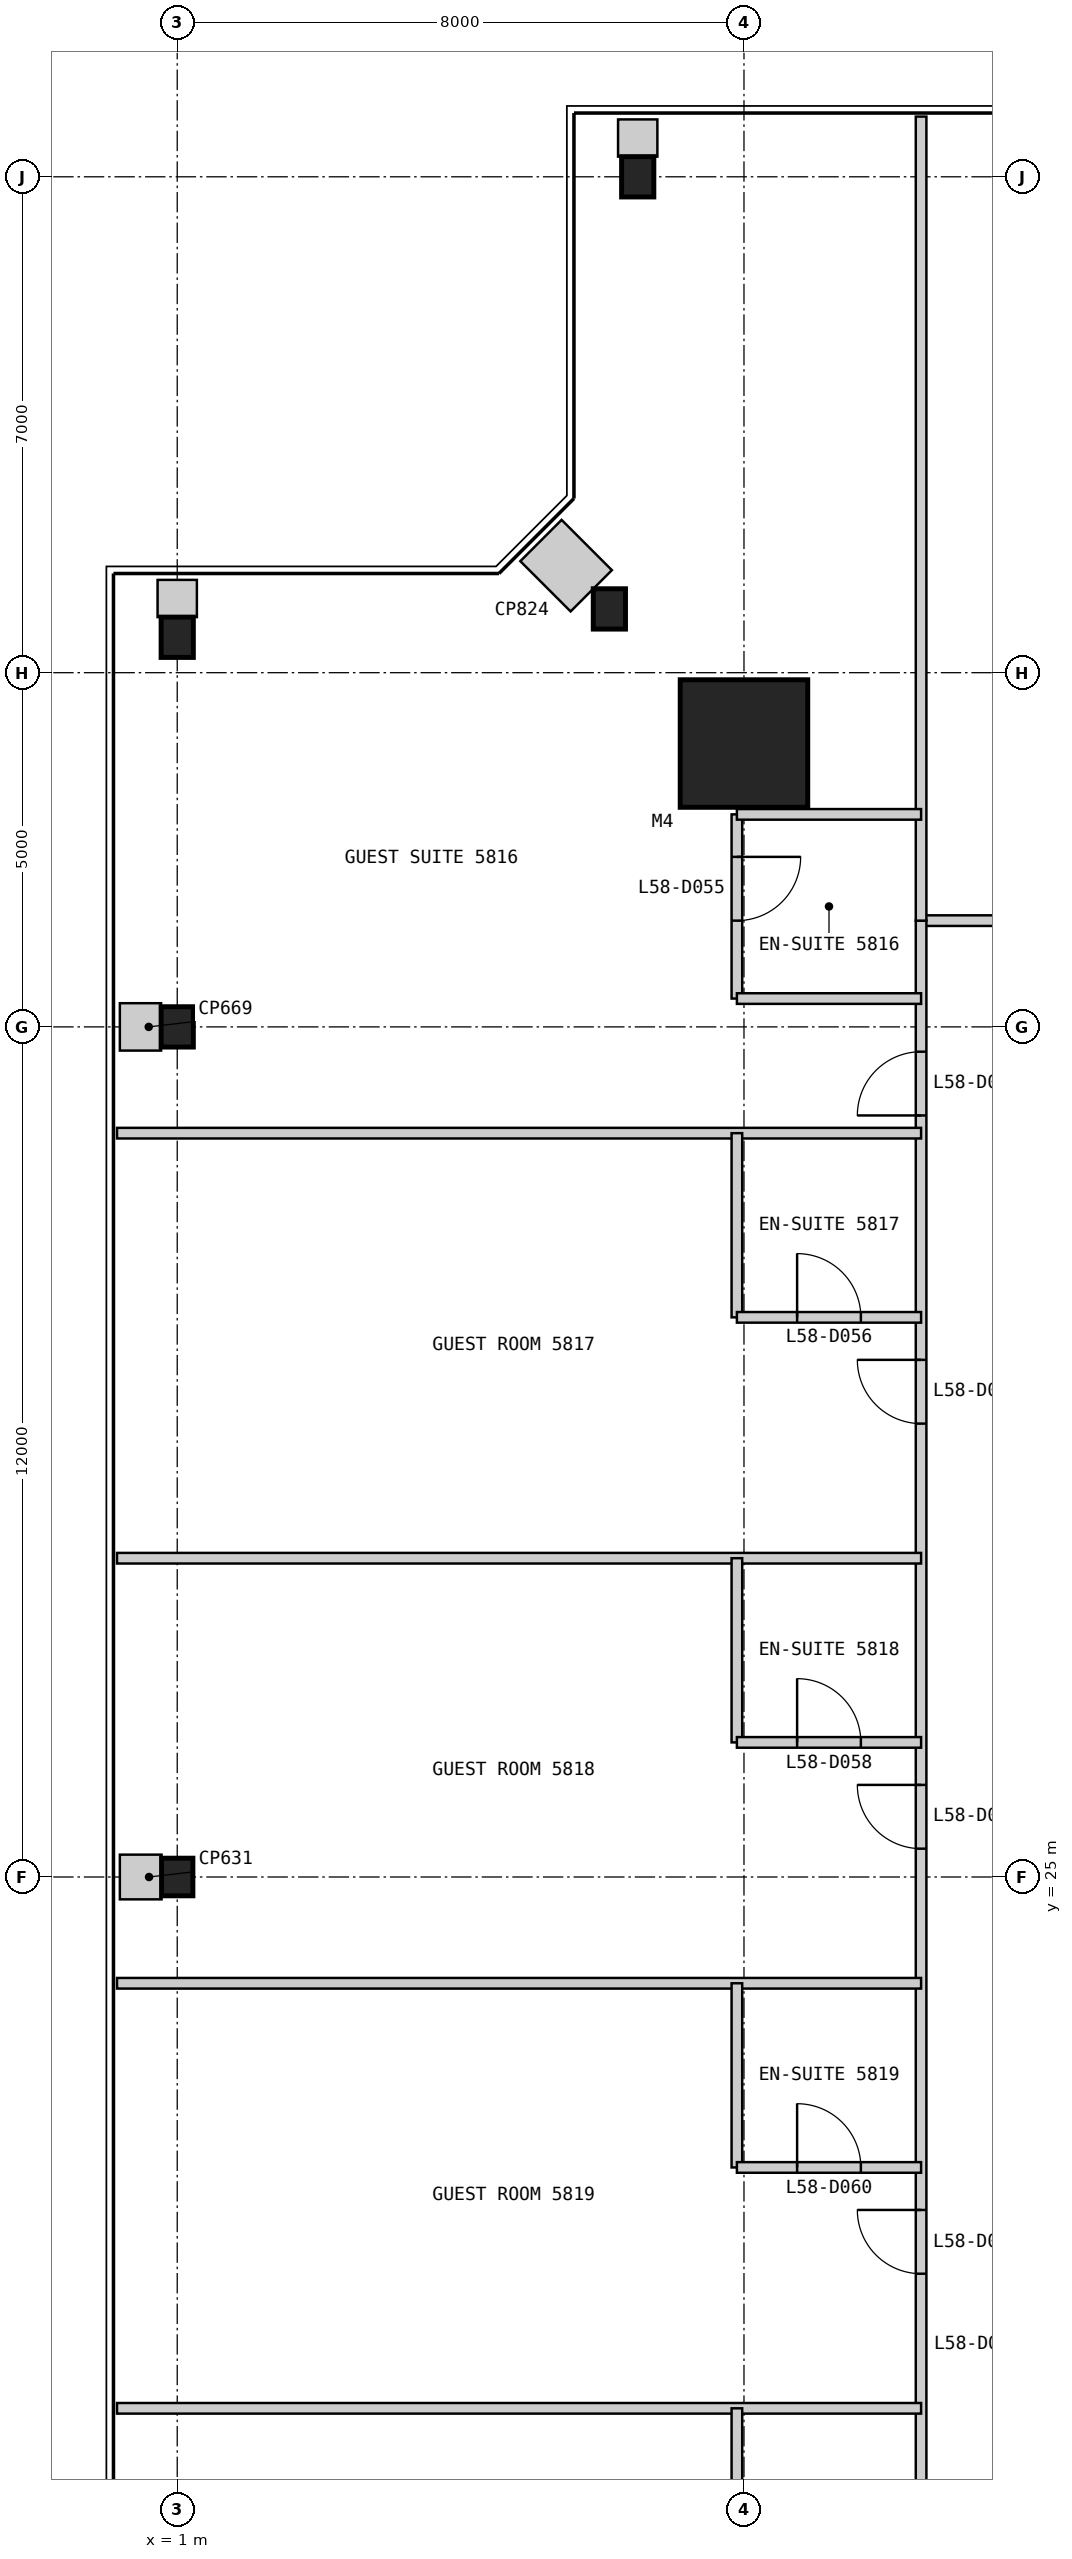
"""IFC4 building model, lengths in metres.
Left out: names, types, materials, properties, quantities, classifications, styles, units other than length and angle.
Written with IfcOpenShell. Run it as: python <this file> out.ifc"""

import sys

from ifc_helpers import new_model, si_unit, direction, frame, frame_2d, origin, origin_2d, place, context, subcontext, project, spatial, rectangle, i_section, extrude, element, fill, save


model = new_model("IFC4")
c1 = context("Model", 3, precision=1e-05, world=origin(), true_north=direction((0.0, 1.0)))
c2 = subcontext(c1, "Body", "Model", "MODEL_VIEW")
j1 = project(units=[si_unit("LENGTHUNIT", "METRE"), si_unit("PLANEANGLEUNIT", "RADIAN")], contexts=[c1])
p1 = place(None, origin())
s1 = spatial("IfcSite", under=j1, at=p1, CompositionType="ELEMENT")
p2 = place(p1, origin())
s2 = spatial("IfcBuilding", under=s1, at=p2, CompositionType="ELEMENT")
p3 = place(p2, frame((0.0, 0.0, 249.2)))
s3 = spatial("IfcBuildingStorey", under=s2, at=p3, CompositionType="ELEMENT", Elevation=249.2)
p4 = place(p3, frame((9.0, 41.0, 0.0), z_axis=(0.0, 0.0, 1.0), x_axis=(1.0, 0.0, 0.0)))
e1 = element("IfcColumn", 1, at=p4, inside=s3, PredefinedType="COLUMN", context=c2, shape_type="SweptSolid", body=[
    extrude(rectangle(XDim=1.8, YDim=1.8, at=origin_2d()), origin(), (0.0, 0.0, 1.0), 3.4),
])
for number, where, z_axis, x_axis in (
    (2, (7.5, 49.0, 0.0), (0.0, 0.0, 1.0), (1.0, 0.0, 0.0)),
    (3, (7.1, 42.9, 0.0), (0.0, 0.0, 1.0), (1.0, 0.0, 0.0)),
    (4, (1.0, 42.5, 0.0), (0.0, 0.0, 1.0), (1.0, 0.0, 0.0)),
    (5, (1.0, 37.0, 0.0), (0.0, 0.0, 1.0), (1.0, 0.0, 0.0)),
):
    element("IfcColumn", number, at=place(p3, frame(where, z_axis=z_axis, x_axis=x_axis)), inside=s3, PredefinedType="COLUMN", context=c2, shape_type="SweptSolid", body=[
        extrude(i_section(OverallWidth=0.455, OverallDepth=0.569, WebThickness=0.078, FlangeThickness=0.125, at=origin_2d()), origin(), (0.0, 0.0, 1.0), 3.4),
    ])
p5 = place(p3, frame((1.0, 25.0, 0.0), z_axis=(0.0, 0.0, 1.0), x_axis=(1.0, 0.0, 0.0)))
e6 = element("IfcColumn", 6, at=p5, inside=s3, PredefinedType="COLUMN", context=c2, shape_type="SweptSolid", body=[
    extrude(i_section(OverallWidth=0.442, OverallDepth=0.531, WebThickness=0.066, FlangeThickness=0.106, at=origin_2d()), origin(), (0.0, 0.0, 1.0), 3.4),
])
p6 = place(p3, frame((38.5, 38.5, 0.0), z_axis=(0.0, 0.0, 1.0), x_axis=(-1.0, 0.0, 0.0)))
e7 = element("IfcWall", 7, at=p6, inside=s3, PredefinedType="PARTITIONING", context=c2, shape_type="SweptSolid", body=[
    extrude(rectangle(XDim=27.0, YDim=0.15, at=frame_2d((13.5, 0.0))), origin(), (0.0, 0.0, 1.0), 3.25),
])
p7 = place(p6, frame((1.85, 0.0, 0.0)))
e8 = element("IfcOpeningElement", 8, at=p7, cuts=e7, PredefinedType="OPENING", context=c2, shape_type="SweptSolid", body=[
    extrude(rectangle(XDim=0.9, YDim=2.1, at=frame_2d((0.45, 1.05))), frame((0.0, 0.085, 0.0), z_axis=(0.0, -1.0, 0.0), x_axis=(1.0, 0.0, 0.0)), (0.0, 0.0, 1.0), 0.17),
])
p8 = place(p6, frame((6.2, 0.0, 0.0)))
e9 = element("IfcOpeningElement", 9, at=p8, cuts=e7, PredefinedType="OPENING", context=c2, shape_type="SweptSolid", body=[
    extrude(rectangle(XDim=0.9, YDim=2.1, at=frame_2d((0.45, 1.05))), frame((0.0, 0.085, 0.0), z_axis=(0.0, -1.0, 0.0), x_axis=(1.0, 0.0, 0.0)), (0.0, 0.0, 1.0), 0.17),
])
p9 = place(p6, frame((12.8, 0.0, 0.0)))
e10 = element("IfcOpeningElement", 10, at=p9, cuts=e7, PredefinedType="OPENING", context=c2, shape_type="SweptSolid", body=[
    extrude(rectangle(XDim=1.0, YDim=2.1, at=frame_2d((0.5, 1.05))), frame((0.0, 0.085, 0.0), z_axis=(0.0, -1.0, 0.0), x_axis=(1.0, 0.0, 0.0)), (0.0, 0.0, 1.0), 0.17),
])
p10 = place(p6, frame((18.2, 0.0, 0.0)))
e11 = element("IfcOpeningElement", 11, at=p10, cuts=e7, PredefinedType="OPENING", context=c2, shape_type="SweptSolid", body=[
    extrude(rectangle(XDim=0.9, YDim=2.1, at=frame_2d((0.45, 1.05))), frame((0.0, 0.085, 0.0), z_axis=(0.0, -1.0, 0.0), x_axis=(1.0, 0.0, 0.0)), (0.0, 0.0, 1.0), 0.17),
])
p11 = place(p6, frame((24.2, 0.0, 0.0)))
e12 = element("IfcOpeningElement", 12, at=p11, cuts=e7, PredefinedType="OPENING", context=c2, shape_type="SweptSolid", body=[
    extrude(rectangle(XDim=0.9, YDim=2.1, at=frame_2d((0.45, 1.05))), frame((0.0, 0.085, 0.0), z_axis=(0.0, -1.0, 0.0), x_axis=(1.0, 0.0, 0.0)), (0.0, 0.0, 1.0), 0.17),
])
p12 = place(p3, frame((11.5, 38.5, 0.0), z_axis=(0.0, 0.0, 1.0), x_axis=(0.0, -1.0, 0.0)))
e13 = element("IfcWall", 13, at=p12, inside=s3, PredefinedType="PARTITIONING", context=c2, shape_type="SweptSolid", body=[
    extrude(rectangle(XDim=27.0, YDim=0.15, at=frame_2d((13.5, 0.0))), origin(), (0.0, 0.0, 1.0), 3.25),
])
p13 = place(p12, frame((1.85, 0.0, 0.0)))
e14 = element("IfcOpeningElement", 14, at=p13, cuts=e13, PredefinedType="OPENING", context=c2, shape_type="SweptSolid", body=[
    extrude(rectangle(XDim=0.9, YDim=2.1, at=frame_2d((0.45, 1.05))), frame((0.0, 0.085, 0.0), z_axis=(0.0, -1.0, 0.0), x_axis=(1.0, 0.0, 0.0)), (0.0, 0.0, 1.0), 0.17),
])
p14 = place(p12, frame((6.2, 0.0, 0.0)))
e15 = element("IfcOpeningElement", 15, at=p14, cuts=e13, PredefinedType="OPENING", context=c2, shape_type="SweptSolid", body=[
    extrude(rectangle(XDim=0.9, YDim=2.1, at=frame_2d((0.45, 1.05))), frame((0.0, 0.085, 0.0), z_axis=(0.0, -1.0, 0.0), x_axis=(1.0, 0.0, 0.0)), (0.0, 0.0, 1.0), 0.17),
])
p15 = place(p12, frame((12.2, 0.0, 0.0)))
e16 = element("IfcOpeningElement", 16, at=p15, cuts=e13, PredefinedType="OPENING", context=c2, shape_type="SweptSolid", body=[
    extrude(rectangle(XDim=0.9, YDim=2.1, at=frame_2d((0.45, 1.05))), frame((0.0, 0.085, 0.0), z_axis=(0.0, -1.0, 0.0), x_axis=(1.0, 0.0, 0.0)), (0.0, 0.0, 1.0), 0.17),
])
p16 = place(p12, frame((18.2, 0.0, 0.0)))
e17 = element("IfcOpeningElement", 17, at=p16, cuts=e13, PredefinedType="OPENING", context=c2, shape_type="SweptSolid", body=[
    extrude(rectangle(XDim=0.9, YDim=2.1, at=frame_2d((0.45, 1.05))), frame((0.0, 0.085, 0.0), z_axis=(0.0, -1.0, 0.0), x_axis=(1.0, 0.0, 0.0)), (0.0, 0.0, 1.0), 0.17),
])
p17 = place(p12, frame((24.2, 0.0, 0.0)))
e18 = element("IfcOpeningElement", 18, at=p17, cuts=e13, PredefinedType="OPENING", context=c2, shape_type="SweptSolid", body=[
    extrude(rectangle(XDim=0.9, YDim=2.1, at=frame_2d((0.45, 1.05))), frame((0.0, 0.085, 0.0), z_axis=(0.0, -1.0, 0.0), x_axis=(1.0, 0.0, 0.0)), (0.0, 0.0, 1.0), 0.17),
])
p18 = place(p3, frame((11.5, 49.85, 0.0), z_axis=(0.0, 0.0, 1.0), x_axis=(0.0, -1.0, 0.0)))
e19 = element("IfcWall", 19, at=p18, inside=s3, PredefinedType="PARTITIONING", context=c2, shape_type="SweptSolid", body=[
    extrude(rectangle(XDim=11.35, YDim=0.15, at=frame_2d((5.675, 0.0))), origin(), (0.0, 0.0, 1.0), 3.25),
])
p19 = place(p3, frame((8.9, 40.0, 0.0), z_axis=(0.0, 0.0, 1.0), x_axis=(0.0, -1.0, 0.0)))
e20 = element("IfcWall", 20, at=p19, inside=s3, PredefinedType="PARTITIONING", context=c2, shape_type="SweptSolid", body=[
    extrude(rectangle(XDim=2.6, YDim=0.15, at=frame_2d((1.3, 0.0))), origin(), (0.0, 0.0, 1.0), 2.638),
])
p20 = place(p19, frame((0.6, 0.0, 0.0)))
e21 = element("IfcOpeningElement", 21, at=p20, cuts=e20, PredefinedType="OPENING", context=c2, shape_type="SweptSolid", body=[
    extrude(rectangle(XDim=0.9, YDim=2.1, at=frame_2d((0.45, 1.05))), frame((0.0, 0.085, 0.0), z_axis=(0.0, -1.0, 0.0), x_axis=(1.0, 0.0, 0.0)), (0.0, 0.0, 1.0), 0.17),
])
for number, where, z_axis, x_axis in (
    (22, (8.9, 40.0, 0.0), (0.0, 0.0, 1.0), (1.0, 0.0, 0.0)),
    (23, (8.9, 37.4, 0.0), (0.0, 0.0, 1.0), (1.0, 0.0, 0.0)),
):
    element("IfcWall", number, at=place(p3, frame(where, z_axis=z_axis, x_axis=x_axis)), inside=s3, PredefinedType="PARTITIONING", context=c2, shape_type="SweptSolid", body=[
        extrude(rectangle(XDim=2.6, YDim=0.15, at=frame_2d((1.3, 0.0))), origin(), (0.0, 0.0, 1.0), 3.25),
    ])
p21 = place(p3, frame((0.15, 35.5, 0.0), z_axis=(0.0, 0.0, 1.0), x_axis=(1.0, 0.0, 0.0)))
e24 = element("IfcWall", 24, at=p21, inside=s3, PredefinedType="PARTITIONING", context=c2, shape_type="SweptSolid", body=[
    extrude(rectangle(XDim=11.35, YDim=0.15, at=frame_2d((5.675, 0.0))), origin(), (0.0, 0.0, 1.0), 3.25),
])
p22 = place(p3, frame((8.9, 35.5, 0.0), z_axis=(0.0, 0.0, 1.0), x_axis=(0.0, -1.0, 0.0)))
e25 = element("IfcWall", 25, at=p22, inside=s3, PredefinedType="PARTITIONING", context=c2, shape_type="SweptSolid", body=[
    extrude(rectangle(XDim=2.6, YDim=0.15, at=frame_2d((1.3, 0.0))), origin(), (0.0, 0.0, 1.0), 3.25),
])
p23 = place(p3, frame((8.9, 32.9, 0.0), z_axis=(0.0, 0.0, 1.0), x_axis=(1.0, 0.0, 0.0)))
e26 = element("IfcWall", 26, at=p23, inside=s3, PredefinedType="PARTITIONING", context=c2, shape_type="SweptSolid", body=[
    extrude(rectangle(XDim=2.6, YDim=0.15, at=frame_2d((1.3, 0.0))), origin(), (0.0, 0.0, 1.0), 3.25),
])
p24 = place(p23, frame((0.85, 0.0, 0.0)))
e27 = element("IfcOpeningElement", 27, at=p24, cuts=e26, PredefinedType="OPENING", context=c2, shape_type="SweptSolid", body=[
    extrude(rectangle(XDim=0.9, YDim=2.1, at=frame_2d((0.45, 1.05))), frame((0.0, 0.085, 0.0), z_axis=(0.0, -1.0, 0.0), x_axis=(1.0, 0.0, 0.0)), (0.0, 0.0, 1.0), 0.17),
])
p25 = place(p3, frame((0.15, 29.5, 0.0), z_axis=(0.0, 0.0, 1.0), x_axis=(1.0, 0.0, 0.0)))
e28 = element("IfcWall", 28, at=p25, inside=s3, PredefinedType="PARTITIONING", context=c2, shape_type="SweptSolid", body=[
    extrude(rectangle(XDim=11.35, YDim=0.15, at=frame_2d((5.675, 0.0))), origin(), (0.0, 0.0, 1.0), 3.25),
])
p26 = place(p3, frame((8.9, 29.5, 0.0), z_axis=(0.0, 0.0, 1.0), x_axis=(0.0, -1.0, 0.0)))
e29 = element("IfcWall", 29, at=p26, inside=s3, PredefinedType="PARTITIONING", context=c2, shape_type="SweptSolid", body=[
    extrude(rectangle(XDim=2.6, YDim=0.15, at=frame_2d((1.3, 0.0))), origin(), (0.0, 0.0, 1.0), 3.25),
])
p27 = place(p3, frame((8.9, 26.9, 0.0), z_axis=(0.0, 0.0, 1.0), x_axis=(1.0, 0.0, 0.0)))
e30 = element("IfcWall", 30, at=p27, inside=s3, PredefinedType="PARTITIONING", context=c2, shape_type="SweptSolid", body=[
    extrude(rectangle(XDim=2.6, YDim=0.15, at=frame_2d((1.3, 0.0))), origin(), (0.0, 0.0, 1.0), 3.25),
])
p28 = place(p27, frame((0.85, 0.0, 0.0)))
e31 = element("IfcOpeningElement", 31, at=p28, cuts=e30, PredefinedType="OPENING", context=c2, shape_type="SweptSolid", body=[
    extrude(rectangle(XDim=0.9, YDim=2.1, at=frame_2d((0.45, 1.05))), frame((0.0, 0.085, 0.0), z_axis=(0.0, -1.0, 0.0), x_axis=(1.0, 0.0, 0.0)), (0.0, 0.0, 1.0), 0.17),
])
p29 = place(p3, frame((0.15, 23.5, 0.0), z_axis=(0.0, 0.0, 1.0), x_axis=(1.0, 0.0, 0.0)))
e32 = element("IfcWall", 32, at=p29, inside=s3, PredefinedType="PARTITIONING", context=c2, shape_type="SweptSolid", body=[
    extrude(rectangle(XDim=11.35, YDim=0.15, at=frame_2d((5.675, 0.0))), origin(), (0.0, 0.0, 1.0), 3.25),
])
p30 = place(p3, frame((8.9, 23.5, 0.0), z_axis=(0.0, 0.0, 1.0), x_axis=(0.0, -1.0, 0.0)))
e33 = element("IfcWall", 33, at=p30, inside=s3, PredefinedType="PARTITIONING", context=c2, shape_type="SweptSolid", body=[
    extrude(rectangle(XDim=2.6, YDim=0.15, at=frame_2d((1.3, 0.0))), origin(), (0.0, 0.0, 1.0), 3.25),
])
p31 = place(p3, frame((8.9, 20.9, 0.0), z_axis=(0.0, 0.0, 1.0), x_axis=(1.0, 0.0, 0.0)))
e34 = element("IfcWall", 34, at=p31, inside=s3, PredefinedType="PARTITIONING", context=c2, shape_type="SweptSolid", body=[
    extrude(rectangle(XDim=2.6, YDim=0.15, at=frame_2d((1.3, 0.0))), origin(), (0.0, 0.0, 1.0), 3.25),
])
p32 = place(p31, frame((0.85, 0.0, 0.0)))
e35 = element("IfcOpeningElement", 35, at=p32, cuts=e34, PredefinedType="OPENING", context=c2, shape_type="SweptSolid", body=[
    extrude(rectangle(XDim=0.9, YDim=2.1, at=frame_2d((0.45, 1.05))), frame((0.0, 0.085, 0.0), z_axis=(0.0, -1.0, 0.0), x_axis=(1.0, 0.0, 0.0)), (0.0, 0.0, 1.0), 0.17),
])
p33 = place(p3, frame((0.15, 17.5, 0.0), z_axis=(0.0, 0.0, 1.0), x_axis=(1.0, 0.0, 0.0)))
e36 = element("IfcWall", 36, at=p33, inside=s3, PredefinedType="PARTITIONING", context=c2, shape_type="SweptSolid", body=[
    extrude(rectangle(XDim=11.35, YDim=0.15, at=frame_2d((5.675, 0.0))), origin(), (0.0, 0.0, 1.0), 3.25),
])
p34 = place(p3, frame((8.9, 17.5, 0.0), z_axis=(0.0, 0.0, 1.0), x_axis=(0.0, -1.0, 0.0)))
e37 = element("IfcWall", 37, at=p34, inside=s3, PredefinedType="PARTITIONING", context=c2, shape_type="SweptSolid", body=[
    extrude(rectangle(XDim=2.6, YDim=0.15, at=frame_2d((1.3, 0.0))), origin(), (0.0, 0.0, 1.0), 3.25),
])
p35 = place(p3, frame((7.5, 49.81, 0.0), z_axis=(0.0, 0.0, 1.0), x_axis=(0.0, -1.0, 0.0)))
e38 = element("IfcWall", 38, at=p35, inside=s3, PredefinedType="PARTITIONING", context=c2, shape_type="SweptSolid", body=[
    extrude(rectangle(XDim=0.526, YDim=0.555, at=frame_2d((0.263, 0.0))), origin(), (0.0, 0.0, 1.0), 3.25),
])
p36 = place(p3, frame((6.134, 43.866, 0.0), z_axis=(0.0, 0.0, 1.0), x_axis=(0.707106781187, -0.707106781187, 0.0)))
e39 = element("IfcWall", 39, at=p36, inside=s3, PredefinedType="PARTITIONING", context=c2, shape_type="SweptSolid", body=[
    extrude(rectangle(XDim=1.004, YDim=0.824, at=frame_2d((0.502, 0.0))), origin(), (0.0, 0.0, 1.0), 3.25),
])
p37 = place(p3, frame((1.0, 43.31, 0.0), z_axis=(0.0, 0.0, 1.0), x_axis=(0.0, -1.0, 0.0)))
e40 = element("IfcWall", 40, at=p37, inside=s3, PredefinedType="PARTITIONING", context=c2, shape_type="SweptSolid", body=[
    extrude(rectangle(XDim=0.526, YDim=0.555, at=frame_2d((0.263, 0.0))), origin(), (0.0, 0.0, 1.0), 3.25),
])
p38 = place(p3, frame((0.19, 37.0, 0.0), z_axis=(0.0, 0.0, 1.0), x_axis=(1.0, 0.0, 0.0)))
e41 = element("IfcWall", 41, at=p38, inside=s3, PredefinedType="PARTITIONING", context=c2, shape_type="SweptSolid", body=[
    extrude(rectangle(XDim=0.583, YDim=0.669, at=frame_2d((0.292, 0.0))), origin(), (0.0, 0.0, 1.0), 3.25),
])
p39 = place(p3, frame((0.19, 25.0, 0.0), z_axis=(0.0, 0.0, 1.0), x_axis=(1.0, 0.0, 0.0)))
e42 = element("IfcWall", 42, at=p39, inside=s3, PredefinedType="PARTITIONING", context=c2, shape_type="SweptSolid", body=[
    extrude(rectangle(XDim=0.589, YDim=0.631, at=frame_2d((0.294, 0.0))), origin(), (0.0, 0.0, 1.0), 3.25),
])
p40 = place(p13, frame((0.9, 0.0, 0.0), z_axis=(0.0, 0.0, 1.0), x_axis=(-1.0, 0.0, 0.0)))
e43 = element("IfcDoor", 43, at=p40, inside=s3, OperationType="SINGLE_SWING_LEFT", PredefinedType="DOOR", context=c2, shape_type="SweptSolid", body=[
    extrude(rectangle(XDim=0.9, YDim=2.1, at=frame_2d((0.45, 1.05))), frame((0.0, 0.025, 0.0), z_axis=(0.0, -1.0, 0.0), x_axis=(1.0, 0.0, 0.0)), (0.0, 0.0, 1.0), 0.05),
])
fill(e14, e43)
p41 = place(p20, origin())
e44 = element("IfcDoor", 44, at=p41, inside=s3, OperationType="SINGLE_SWING_LEFT", PredefinedType="DOOR", context=c2, shape_type="SweptSolid", body=[
    extrude(rectangle(XDim=0.9, YDim=2.1, at=frame_2d((0.45, 1.05))), frame((0.0, 0.025, 0.0), z_axis=(0.0, -1.0, 0.0), x_axis=(1.0, 0.0, 0.0)), (0.0, 0.0, 1.0), 0.05),
])
fill(e21, e44)
p42 = place(p24, origin())
e45 = element("IfcDoor", 45, at=p42, inside=s3, OperationType="SINGLE_SWING_LEFT", PredefinedType="DOOR", context=c2, shape_type="SweptSolid", body=[
    extrude(rectangle(XDim=0.9, YDim=2.1, at=frame_2d((0.45, 1.05))), frame((0.0, 0.025, 0.0), z_axis=(0.0, -1.0, 0.0), x_axis=(1.0, 0.0, 0.0)), (0.0, 0.0, 1.0), 0.05),
])
fill(e27, e45)
p43 = place(p14, frame((0.9, 0.0, 0.0), z_axis=(0.0, 0.0, 1.0), x_axis=(-1.0, 0.0, 0.0)))
e46 = element("IfcDoor", 46, at=p43, inside=s3, OperationType="SINGLE_SWING_RIGHT", PredefinedType="DOOR", context=c2, shape_type="SweptSolid", body=[
    extrude(rectangle(XDim=0.9, YDim=2.1, at=frame_2d((0.45, 1.05))), frame((0.0, 0.025, 0.0), z_axis=(0.0, -1.0, 0.0), x_axis=(1.0, 0.0, 0.0)), (0.0, 0.0, 1.0), 0.05),
])
fill(e15, e46)
p44 = place(p28, origin())
e47 = element("IfcDoor", 47, at=p44, inside=s3, OperationType="SINGLE_SWING_LEFT", PredefinedType="DOOR", context=c2, shape_type="SweptSolid", body=[
    extrude(rectangle(XDim=0.9, YDim=2.1, at=frame_2d((0.45, 1.05))), frame((0.0, 0.025, 0.0), z_axis=(0.0, -1.0, 0.0), x_axis=(1.0, 0.0, 0.0)), (0.0, 0.0, 1.0), 0.05),
])
fill(e31, e47)
p45 = place(p15, frame((0.9, 0.0, 0.0), z_axis=(0.0, 0.0, 1.0), x_axis=(-1.0, 0.0, 0.0)))
e48 = element("IfcDoor", 48, at=p45, inside=s3, OperationType="SINGLE_SWING_RIGHT", PredefinedType="DOOR", context=c2, shape_type="SweptSolid", body=[
    extrude(rectangle(XDim=0.9, YDim=2.1, at=frame_2d((0.45, 1.05))), frame((0.0, 0.025, 0.0), z_axis=(0.0, -1.0, 0.0), x_axis=(1.0, 0.0, 0.0)), (0.0, 0.0, 1.0), 0.05),
])
fill(e16, e48)
p46 = place(p32, origin())
e49 = element("IfcDoor", 49, at=p46, inside=s3, OperationType="SINGLE_SWING_LEFT", PredefinedType="DOOR", context=c2, shape_type="SweptSolid", body=[
    extrude(rectangle(XDim=0.9, YDim=2.1, at=frame_2d((0.45, 1.05))), frame((0.0, 0.025, 0.0), z_axis=(0.0, -1.0, 0.0), x_axis=(1.0, 0.0, 0.0)), (0.0, 0.0, 1.0), 0.05),
])
fill(e35, e49)
p47 = place(p16, frame((0.9, 0.0, 0.0), z_axis=(0.0, 0.0, 1.0), x_axis=(-1.0, 0.0, 0.0)))
e50 = element("IfcDoor", 50, at=p47, inside=s3, OperationType="SINGLE_SWING_RIGHT", PredefinedType="DOOR", context=c2, shape_type="SweptSolid", body=[
    extrude(rectangle(XDim=0.9, YDim=2.1, at=frame_2d((0.45, 1.05))), frame((0.0, 0.025, 0.0), z_axis=(0.0, -1.0, 0.0), x_axis=(1.0, 0.0, 0.0)), (0.0, 0.0, 1.0), 0.05),
])
fill(e17, e50)
save(model, sys.argv[1])
